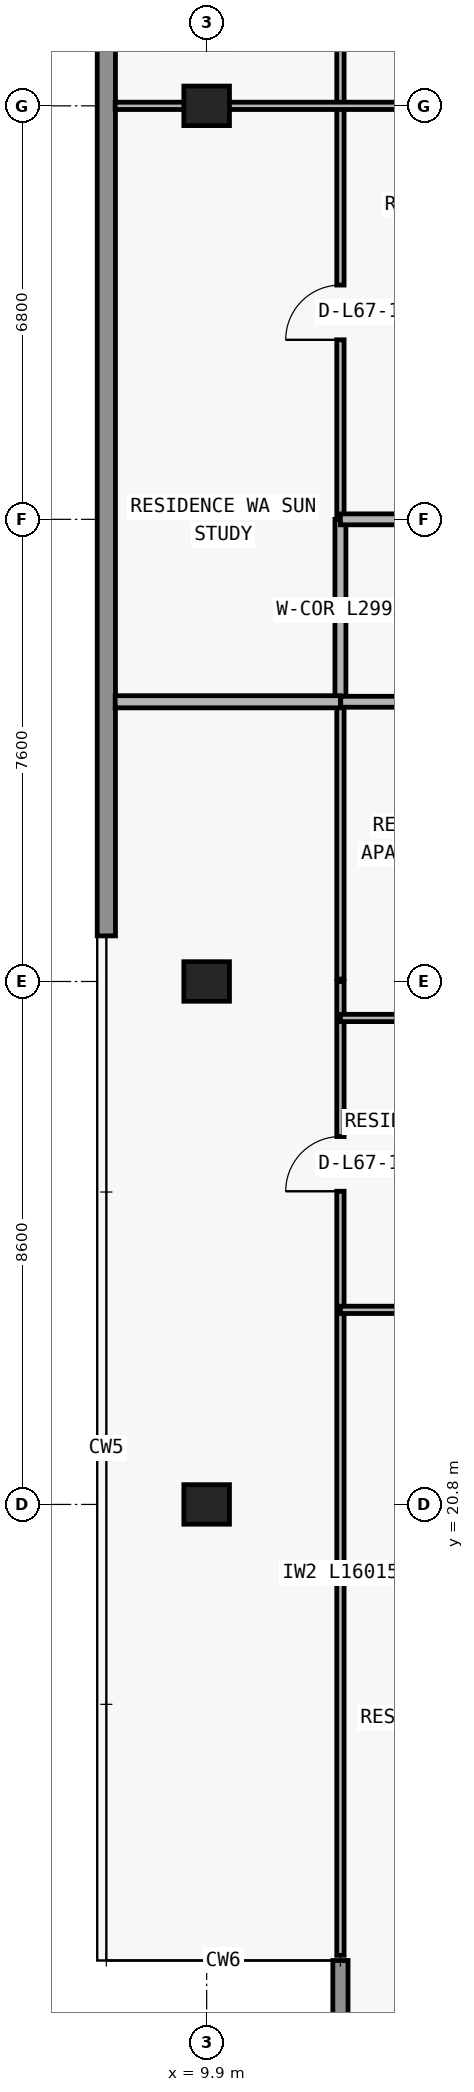
"""IFC4 building model, lengths in metres.
Left out: names, types, materials, properties, quantities, classifications, styles, units other than length and angle.
Written with IfcOpenShell. Run it as: python <this file> out.ifc"""

import sys

from ifc_helpers import new_model, si_unit, direction, frame, frame_2d, origin, origin_2d, place, context, subcontext, project, spatial, rectangle, extrude, element, fill, save


model = new_model("IFC4")
c1 = context("Model", 3, precision=1e-05, world=origin(), true_north=direction((0.0, 1.0)))
c2 = subcontext(c1, "Body", "Model", "MODEL_VIEW")
j1 = project(units=[si_unit("LENGTHUNIT", "METRE"), si_unit("PLANEANGLEUNIT", "RADIAN")], contexts=[c1])
p1 = place(None, origin())
s1 = spatial("IfcSite", under=j1, at=p1, CompositionType="ELEMENT")
p2 = place(p1, origin())
s2 = spatial("IfcBuilding", under=s1, at=p2, CompositionType="ELEMENT")
p3 = place(p2, frame((0.0, 0.0, 239.7)))
s3 = spatial("IfcBuildingStorey", under=s2, at=p3, CompositionType="ELEMENT", Elevation=239.7)
for number, where, z_axis, x_axis in (
    (1, (9.9, 20.8, 0.0), (0.0, 0.0, 1.0), (1.0, 0.0, 0.0)),
    (2, (9.9, 29.4, 0.0), (0.0, 0.0, 1.0), (1.0, 0.0, 0.0)),
    (3, (9.9, 43.8, 0.0), (0.0, 0.0, 1.0), (1.0, 0.0, 0.0)),
):
    element("IfcColumn", number, at=place(p3, frame(where, z_axis=z_axis, x_axis=x_axis)), inside=s3, PredefinedType="COLUMN", context=c2, shape_type="SweptSolid", body=[
        extrude(rectangle(XDim=0.75, YDim=0.65, at=origin_2d()), origin(), (0.0, 0.0, 1.0), 3.05),
    ])
p4 = place(p3, frame((12.1, 13.3, 0.0), z_axis=(0.0, 0.0, 1.0), x_axis=(0.0, -1.0, 0.0)))
e4 = element("IfcWall", 4, at=p4, inside=s3, PredefinedType="ELEMENTEDWALL", context=c2, shape_type="SweptSolid", body=[
    extrude(rectangle(XDim=3.45, YDim=0.25, at=frame_2d((1.725, 0.0))), origin(), (0.0, 0.0, 1.0), 3.05),
])
p5 = place(p3, frame((8.25, 30.15, 0.0), z_axis=(0.0, 0.0, 1.0), x_axis=(0.0, 1.0, 0.0)))
e5 = element("IfcWall", 5, at=p5, inside=s3, PredefinedType="STANDARD", context=c2, shape_type="SweptSolid", body=[
    extrude(rectangle(XDim=16.85, YDim=0.3, at=frame_2d((8.425, 0.0))), origin(), (0.0, 0.0, 1.0), 3.05),
])
p6 = place(p3, frame((12.1, 13.385, 0.0), z_axis=(0.0, 0.0, 1.0), x_axis=(0.0, 1.0, 0.0)))
e6 = element("IfcWall", 6, at=p6, inside=s3, PredefinedType="PARTITIONING", context=c2, shape_type="SweptSolid", body=[
    extrude(rectangle(XDim=16.015, YDim=0.12, at=frame_2d((8.007, 0.0))), origin(), (0.0, 0.0, 1.0), 3.05),
])
p7 = place(p6, frame((12.565, 0.0, 0.0)))
e7 = element("IfcOpeningElement", 7, at=p7, cuts=e6, PredefinedType="OPENING", context=c2, shape_type="SweptSolid", body=[
    extrude(rectangle(XDim=0.9, YDim=2.15, at=frame_2d((0.45, 1.075))), frame((0.0, 0.07, 0.0), z_axis=(0.0, -1.0, 0.0), x_axis=(1.0, 0.0, 0.0)), (0.0, 0.0, 1.0), 0.14),
])
p8 = place(p3, frame((12.1, 29.44, 0.0), z_axis=(0.0, 0.0, 1.0), x_axis=(0.0, 1.0, 0.0)))
e8 = element("IfcWall", 8, at=p8, inside=s3, PredefinedType="PARTITIONING", context=c2, shape_type="SweptSolid", body=[
    extrude(rectangle(XDim=4.56, YDim=0.12, at=frame_2d((2.28, 0.0))), origin(), (0.0, 0.0, 1.0), 3.05),
])
p9 = place(p3, frame((12.1, 34.005, 0.0), z_axis=(0.0, 0.0, 1.0), x_axis=(0.0, 1.0, 0.0)))
e9 = element("IfcWall", 9, at=p9, inside=s3, PredefinedType="PARTITIONING", context=c2, shape_type="SweptSolid", body=[
    extrude(rectangle(XDim=2.995, YDim=0.18, at=frame_2d((1.498, 0.0))), origin(), (0.0, 0.0, 1.0), 3.05),
])
p10 = place(p3, frame((12.1, 37.005, 0.0), z_axis=(0.0, 0.0, 1.0), x_axis=(0.0, 1.0, 0.0)))
e10 = element("IfcWall", 10, at=p10, inside=s3, PredefinedType="PARTITIONING", context=c2, shape_type="SweptSolid", body=[
    extrude(rectangle(XDim=9.875, YDim=0.12, at=frame_2d((4.938, 0.0))), origin(), (0.0, 0.0, 1.0), 3.05),
])
p11 = place(p10, frame((2.948, 0.0, 0.0)))
e11 = element("IfcOpeningElement", 11, at=p11, cuts=e10, PredefinedType="OPENING", context=c2, shape_type="SweptSolid", body=[
    extrude(rectangle(XDim=0.9, YDim=2.15, at=frame_2d((0.45, 1.075))), frame((0.0, 0.07, 0.0), z_axis=(0.0, -1.0, 0.0), x_axis=(1.0, 0.0, 0.0)), (0.0, 0.0, 1.0), 0.14),
])
p12 = place(p10, frame((7.885, 0.0, 0.0)))
e12 = element("IfcOpeningElement", 12, at=p12, cuts=e10, PredefinedType="OPENING", context=c2, shape_type="SweptSolid", body=[
    extrude(rectangle(XDim=0.9, YDim=2.15, at=frame_2d((0.45, 1.075))), frame((0.0, 0.07, 0.0), z_axis=(0.0, -1.0, 0.0), x_axis=(1.0, 0.0, 0.0)), (0.0, 0.0, 1.0), 0.14),
])
p13 = place(p3, frame((12.1, 24.0, 0.0), z_axis=(0.0, 0.0, 1.0), x_axis=(1.0, 0.0, 0.0)))
e13 = element("IfcWall", 13, at=p13, inside=s3, PredefinedType="PARTITIONING", context=c2, shape_type="SweptSolid", body=[
    extrude(rectangle(XDim=6.2, YDim=0.12, at=frame_2d((3.1, 0.0))), origin(), (0.0, 0.0, 1.0), 3.05),
])
p14 = place(p13, frame((2.65, 0.0, 0.0)))
e14 = element("IfcOpeningElement", 14, at=p14, cuts=e13, PredefinedType="OPENING", context=c2, shape_type="SweptSolid", body=[
    extrude(rectangle(XDim=0.9, YDim=2.15, at=frame_2d((0.45, 1.075))), frame((0.0, 0.07, 0.0), z_axis=(0.0, -1.0, 0.0), x_axis=(1.0, 0.0, 0.0)), (0.0, 0.0, 1.0), 0.14),
])
p15 = place(p3, frame((12.1, 28.8, 0.0), z_axis=(0.0, 0.0, 1.0), x_axis=(1.0, 0.0, 0.0)))
e15 = element("IfcWall", 15, at=p15, inside=s3, PredefinedType="PARTITIONING", context=c2, shape_type="SweptSolid", body=[
    extrude(rectangle(XDim=6.195, YDim=0.12, at=frame_2d((3.097, 0.0))), origin(), (0.0, 0.0, 1.0), 3.05),
])
p16 = place(p15, frame((1.659, 0.0, 0.0)))
e16 = element("IfcOpeningElement", 16, at=p16, cuts=e15, PredefinedType="OPENING", context=c2, shape_type="SweptSolid", body=[
    extrude(rectangle(XDim=0.9, YDim=2.15, at=frame_2d((0.45, 1.075))), frame((0.0, 0.07, 0.0), z_axis=(0.0, -1.0, 0.0), x_axis=(1.0, 0.0, 0.0)), (0.0, 0.0, 1.0), 0.14),
])
p17 = place(p3, frame((8.395, 34.0, 0.0), z_axis=(0.0, 0.0, 1.0), x_axis=(1.0, 0.0, 0.0)))
e17 = element("IfcWall", 17, at=p17, inside=s3, PredefinedType="PARTITIONING", context=c2, shape_type="SweptSolid", body=[
    extrude(rectangle(XDim=3.705, YDim=0.2, at=frame_2d((1.853, 0.0))), origin(), (0.0, 0.0, 1.0), 3.05),
])
p18 = place(p3, frame((12.105, 34.0, 0.0), z_axis=(0.0, 0.0, 1.0), x_axis=(1.0, 0.0, 0.0)))
e18 = element("IfcWall", 18, at=p18, inside=s3, PredefinedType="PARTITIONING", context=c2, shape_type="SweptSolid", body=[
    extrude(rectangle(XDim=53.595, YDim=0.18, at=frame_2d((26.797, 0.0))), origin(), (0.0, 0.0, 1.0), 3.05),
])
p19 = place(p18, frame((1.607, 0.0, 0.0)))
e19 = element("IfcOpeningElement", 19, at=p19, cuts=e18, PredefinedType="OPENING", context=c2, shape_type="SweptSolid", body=[
    extrude(rectangle(XDim=1.0, YDim=2.2, at=frame_2d((0.5, 1.1))), frame((0.0, 0.1, 0.0), z_axis=(0.0, -1.0, 0.0), x_axis=(1.0, 0.0, 0.0)), (0.0, 0.0, 1.0), 0.2),
])
p20 = place(p18, frame((17.057, 0.0, 0.0)))
e20 = element("IfcOpeningElement", 20, at=p20, cuts=e18, PredefinedType="OPENING", context=c2, shape_type="SweptSolid", body=[
    extrude(rectangle(XDim=1.0, YDim=2.2, at=frame_2d((0.5, 1.1))), frame((0.0, 0.1, 0.0), z_axis=(0.0, -1.0, 0.0), x_axis=(1.0, 0.0, 0.0)), (0.0, 0.0, 1.0), 0.2),
])
p21 = place(p18, frame((25.242, 0.0, 0.0)))
e21 = element("IfcOpeningElement", 21, at=p21, cuts=e18, PredefinedType="OPENING", context=c2, shape_type="SweptSolid", body=[
    extrude(rectangle(XDim=1.0, YDim=2.2, at=frame_2d((0.5, 1.1))), frame((0.0, 0.1, 0.0), z_axis=(0.0, -1.0, 0.0), x_axis=(1.0, 0.0, 0.0)), (0.0, 0.0, 1.0), 0.2),
])
p22 = place(p18, frame((33.092, 0.0, 0.0)))
e22 = element("IfcOpeningElement", 22, at=p22, cuts=e18, PredefinedType="OPENING", context=c2, shape_type="SweptSolid", body=[
    extrude(rectangle(XDim=1.0, YDim=2.2, at=frame_2d((0.5, 1.1))), frame((0.0, 0.1, 0.0), z_axis=(0.0, -1.0, 0.0), x_axis=(1.0, 0.0, 0.0)), (0.0, 0.0, 1.0), 0.2),
])
p23 = place(p18, frame((41.705, 0.0, 0.0)))
e23 = element("IfcOpeningElement", 23, at=p23, cuts=e18, PredefinedType="OPENING", context=c2, shape_type="SweptSolid", body=[
    extrude(rectangle(XDim=1.0, YDim=2.2, at=frame_2d((0.5, 1.1))), frame((0.0, 0.1, 0.0), z_axis=(0.0, -1.0, 0.0), x_axis=(1.0, 0.0, 0.0)), (0.0, 0.0, 1.0), 0.2),
])
p24 = place(p3, frame((12.1, 37.0, 0.0), z_axis=(0.0, 0.0, 1.0), x_axis=(1.0, 0.0, 0.0)))
e24 = element("IfcWall", 24, at=p24, inside=s3, PredefinedType="PARTITIONING", context=c2, shape_type="SweptSolid", body=[
    extrude(rectangle(XDim=5.845, YDim=0.18, at=frame_2d((2.922, 0.0))), origin(), (0.0, 0.0, 1.0), 3.05),
])
p25 = place(p24, frame((1.275, 0.0, 0.0)))
e25 = element("IfcOpeningElement", 25, at=p25, cuts=e24, PredefinedType="OPENING", context=c2, shape_type="SweptSolid", body=[
    extrude(rectangle(XDim=1.0, YDim=2.2, at=frame_2d((0.5, 1.1))), frame((0.0, 0.1, 0.0), z_axis=(0.0, -1.0, 0.0), x_axis=(1.0, 0.0, 0.0)), (0.0, 0.0, 1.0), 0.2),
])
p26 = place(p3, frame((8.395, 43.8, 0.0), z_axis=(0.0, 0.0, 1.0), x_axis=(1.0, 0.0, 0.0)))
e26 = element("IfcWall", 26, at=p26, inside=s3, PredefinedType="PARTITIONING", context=c2, shape_type="SweptSolid", body=[
    extrude(rectangle(XDim=9.56, YDim=0.12, at=frame_2d((4.78, 0.0))), origin(), (0.0, 0.0, 1.0), 2.418),
])
p27 = place(p26, frame((5.03, 0.0, 0.0)))
e27 = element("IfcOpeningElement", 27, at=p27, cuts=e26, PredefinedType="OPENING", context=c2, shape_type="SweptSolid", body=[
    extrude(rectangle(XDim=0.9, YDim=2.15, at=frame_2d((0.45, 1.075))), frame((0.0, 0.07, 0.0), z_axis=(0.0, -1.0, 0.0), x_axis=(1.0, 0.0, 0.0)), (0.0, 0.0, 1.0), 0.14),
])
p28 = place(p26, frame((7.982, 0.0, 0.0)))
e28 = element("IfcOpeningElement", 28, at=p28, cuts=e26, PredefinedType="OPENING", context=c2, shape_type="SweptSolid", body=[
    extrude(rectangle(XDim=0.85, YDim=2.1, at=frame_2d((0.425, 1.05))), frame((0.0, 0.07, 0.0), z_axis=(0.0, -1.0, 0.0), x_axis=(1.0, 0.0, 0.0)), (0.0, 0.0, 1.0), 0.14),
])
p29 = place(p7, origin())
e29 = element("IfcDoor", 29, at=p29, inside=s3, OperationType="SINGLE_SWING_LEFT", PredefinedType="DOOR", context=c2, shape_type="SweptSolid", body=[
    extrude(rectangle(XDim=0.9, YDim=2.15, at=frame_2d((0.45, 1.075))), frame((0.0, 0.025, 0.0), z_axis=(0.0, -1.0, 0.0), x_axis=(1.0, 0.0, 0.0)), (0.0, 0.0, 1.0), 0.05),
])
fill(e7, e29)
p30 = place(p11, origin())
e30 = element("IfcDoor", 30, at=p30, inside=s3, OperationType="SINGLE_SWING_LEFT", PredefinedType="DOOR", context=c2, shape_type="SweptSolid", body=[
    extrude(rectangle(XDim=0.9, YDim=2.15, at=frame_2d((0.45, 1.075))), frame((0.0, 0.025, 0.0), z_axis=(0.0, -1.0, 0.0), x_axis=(1.0, 0.0, 0.0)), (0.0, 0.0, 1.0), 0.05),
])
fill(e11, e30)
save(model, sys.argv[1])
